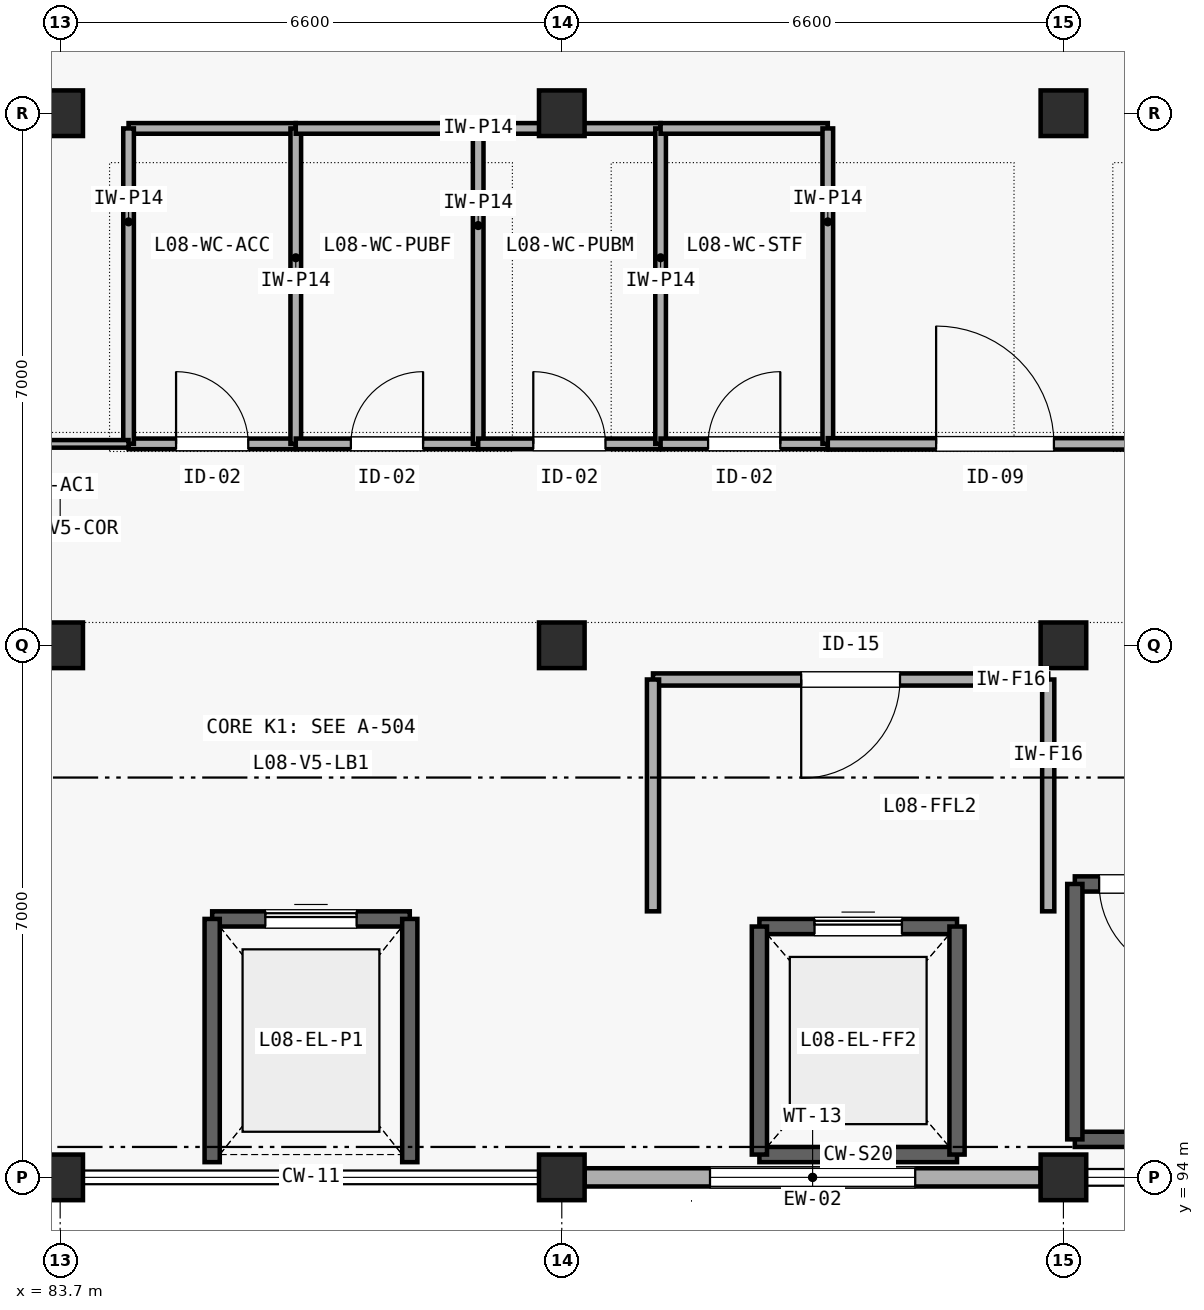
"""IFC4 building model, lengths in metres.
Left out: names, types, materials, properties, quantities, classifications, styles, units other than length and angle.
Written with IfcOpenShell. Run it as: python <this file> out.ifc"""

import sys

from ifc_helpers import new_model, si_unit, direction, frame, frame_2d, origin, origin_2d, place, context, subcontext, project, spatial, rectangle, extrude, element, fill, save


model = new_model("IFC4")
c1 = context("Model", 3, precision=1e-05, world=origin(), true_north=direction((0.0, 1.0)))
c2 = subcontext(c1, "Body", "Model", "MODEL_VIEW")
j1 = project(units=[si_unit("LENGTHUNIT", "METRE"), si_unit("PLANEANGLEUNIT", "RADIAN")], contexts=[c1])
p1 = place(None, origin())
s1 = spatial("IfcSite", under=j1, at=p1, CompositionType="ELEMENT")
p2 = place(p1, origin())
s2 = spatial("IfcBuilding", under=s1, at=p2, CompositionType="ELEMENT")
p3 = place(p2, frame((0.0, 0.0, 33.6)))
s3 = spatial("IfcBuildingStorey", under=s2, at=p3, CompositionType="ELEMENT", Elevation=33.6)
for number, where, z_axis, x_axis in (
    (1, (83.7, 94.0, 0.0), (0.0, 0.0, 1.0), (1.0, 0.0, 0.0)),
    (2, (83.7, 101.0, 0.0), (0.0, 0.0, 1.0), (1.0, 0.0, 0.0)),
    (3, (83.7, 108.0, 0.0), (0.0, 0.0, 1.0), (1.0, 0.0, 0.0)),
    (4, (90.3, 94.0, 0.0), (0.0, 0.0, 1.0), (1.0, 0.0, 0.0)),
    (5, (90.3, 101.0, 0.0), (0.0, 0.0, 1.0), (1.0, 0.0, 0.0)),
    (6, (90.3, 108.0, 0.0), (0.0, 0.0, 1.0), (1.0, 0.0, 0.0)),
    (7, (96.9, 94.0, 0.0), (0.0, 0.0, 1.0), (1.0, 0.0, 0.0)),
    (8, (96.9, 101.0, 0.0), (0.0, 0.0, 1.0), (1.0, 0.0, 0.0)),
    (9, (96.9, 108.0, 0.0), (0.0, 0.0, 1.0), (1.0, 0.0, 0.0)),
):
    element("IfcColumn", number, at=place(p3, frame(where, z_axis=z_axis, x_axis=x_axis)), inside=s3, PredefinedType="COLUMN", context=c2, shape_type="SweptSolid", body=[
        extrude(rectangle(XDim=0.6, YDim=0.6, at=origin_2d()), origin(), (0.0, 0.0, 1.0), 4.2),
    ])
p4 = place(p3, frame((90.6, 94.0, 0.0), z_axis=(0.0, 0.0, 1.0), x_axis=(1.0, 0.0, 0.0)))
e10 = element("IfcWall", 10, at=p4, inside=s3, PredefinedType="SOLIDWALL", context=c2, shape_type="SweptSolid", body=[
    extrude(rectangle(XDim=6.0, YDim=0.24, at=frame_2d((3.0, 0.0))), origin(), (0.0, 0.0, 1.0), 3.365),
])
p5 = place(p4, frame((1.65, 0.0, 0.85)))
e11 = element("IfcOpeningElement", 11, at=p5, cuts=e10, PredefinedType="OPENING", context=c2, shape_type="SweptSolid", body=[
    extrude(rectangle(XDim=2.7, YDim=1.5, at=frame_2d((1.35, 0.75))), frame((0.0, 0.13, 0.0), z_axis=(0.0, -1.0, 0.0), x_axis=(1.0, 0.0, 0.0)), (0.0, 0.0, 1.0), 0.26),
])
p6 = place(p3, frame((97.05, 94.5, 0.0), z_axis=(0.0, 0.0, 1.0), x_axis=(1.0, 0.0, 0.0)))
e12 = element("IfcWall", 12, at=p6, inside=s3, PredefinedType="SHEAR", context=c2, shape_type="SweptSolid", body=[
    extrude(rectangle(XDim=6.3, YDim=0.2, at=frame_2d((3.15, 0.0))), origin(), (0.0, 0.0, 1.0), 4.2),
])
p7 = place(p3, frame((97.05, 97.86, 0.0), z_axis=(0.0, 0.0, 1.0), x_axis=(1.0, 0.0, 0.0)))
e13 = element("IfcWall", 13, at=p7, inside=s3, PredefinedType="SHEAR", context=c2, shape_type="SweptSolid", body=[
    extrude(rectangle(XDim=6.3, YDim=0.2, at=frame_2d((3.15, 0.0))), origin(), (0.0, 0.0, 1.0), 4.2),
])
p8 = place(p7, frame((0.32, 0.0, 0.0)))
e14 = element("IfcOpeningElement", 14, at=p8, cuts=e13, PredefinedType="OPENING", context=c2, shape_type="SweptSolid", body=[
    extrude(rectangle(XDim=1.2, YDim=2.15, at=frame_2d((0.6, 1.075))), frame((0.0, 0.11, 0.0), z_axis=(0.0, -1.0, 0.0), x_axis=(1.0, 0.0, 0.0)), (0.0, 0.0, 1.0), 0.22),
])
p9 = place(p3, frame((97.05, 94.5, 0.0), z_axis=(0.0, 0.0, 1.0), x_axis=(0.0, 1.0, 0.0)))
e15 = element("IfcWall", 15, at=p9, inside=s3, PredefinedType="SHEAR", context=c2, shape_type="SweptSolid", body=[
    extrude(rectangle(XDim=3.36, YDim=0.2, at=frame_2d((1.68, 0.0))), origin(), (0.0, 0.0, 1.0), 4.2),
])
p10 = place(p3, frame((92.9, 94.3, 0.0), z_axis=(0.0, 0.0, 1.0), x_axis=(1.0, 0.0, 0.0)))
e16 = element("IfcWall", 16, at=p10, inside=s3, PredefinedType="SHEAR", context=c2, shape_type="SweptSolid", body=[
    extrude(rectangle(XDim=2.6, YDim=0.2, at=frame_2d((1.3, 0.0))), origin(), (0.0, 0.0, 1.0), 4.2),
])
p11 = place(p3, frame((92.9, 97.3, 0.0), z_axis=(0.0, 0.0, 1.0), x_axis=(1.0, 0.0, 0.0)))
e17 = element("IfcWall", 17, at=p11, inside=s3, PredefinedType="SHEAR", context=c2, shape_type="SweptSolid", body=[
    extrude(rectangle(XDim=2.6, YDim=0.2, at=frame_2d((1.3, 0.0))), origin(), (0.0, 0.0, 1.0), 4.2),
])
p12 = place(p11, frame((0.725, 0.0, 0.0)))
e18 = element("IfcOpeningElement", 18, at=p12, cuts=e17, PredefinedType="OPENING", context=c2, shape_type="SweptSolid", body=[
    extrude(rectangle(XDim=1.15, YDim=2.2, at=frame_2d((0.575, 1.1))), frame((0.0, 0.11, 0.0), z_axis=(0.0, -1.0, 0.0), x_axis=(1.0, 0.0, 0.0)), (0.0, 0.0, 1.0), 0.22),
])
for number, where, z_axis, x_axis in (
    (19, (92.9, 94.3, 0.0), (0.0, 0.0, 1.0), (0.0, 1.0, 0.0)),
    (20, (95.5, 94.3, 0.0), (0.0, 0.0, 1.0), (0.0, 1.0, 0.0)),
):
    element("IfcWall", number, at=place(p3, frame(where, z_axis=z_axis, x_axis=x_axis)), inside=s3, PredefinedType="SHEAR", context=c2, shape_type="SweptSolid", body=[
        extrude(rectangle(XDim=3.0, YDim=0.2, at=frame_2d((1.5, 0.0))), origin(), (0.0, 0.0, 1.0), 4.2),
    ])
p13 = place(p3, frame((85.7, 97.4, 0.0), z_axis=(0.0, 0.0, 1.0), x_axis=(1.0, 0.0, 0.0)))
e21 = element("IfcWall", 21, at=p13, inside=s3, PredefinedType="SHEAR", context=c2, shape_type="SweptSolid", body=[
    extrude(rectangle(XDim=2.6, YDim=0.2, at=frame_2d((1.3, 0.0))), origin(), (0.0, 0.0, 1.0), 4.2),
])
p14 = place(p13, frame((0.7, 0.0, 0.0)))
e22 = element("IfcOpeningElement", 22, at=p14, cuts=e21, PredefinedType="OPENING", context=c2, shape_type="SweptSolid", body=[
    extrude(rectangle(XDim=1.2, YDim=2.2, at=frame_2d((0.6, 1.1))), frame((0.0, 0.11, 0.0), z_axis=(0.0, -1.0, 0.0), x_axis=(1.0, 0.0, 0.0)), (0.0, 0.0, 1.0), 0.22),
])
for number, where, z_axis, x_axis in (
    (23, (85.7, 94.2, 0.0), (0.0, 0.0, 1.0), (0.0, 1.0, 0.0)),
    (24, (88.3, 94.2, 0.0), (0.0, 0.0, 1.0), (0.0, 1.0, 0.0)),
):
    element("IfcWall", number, at=place(p3, frame(where, z_axis=z_axis, x_axis=x_axis)), inside=s3, PredefinedType="SHEAR", context=c2, shape_type="SweptSolid", body=[
        extrude(rectangle(XDim=3.2, YDim=0.2, at=frame_2d((1.6, 0.0))), origin(), (0.0, 0.0, 1.0), 4.2),
    ])
p15 = place(p3, frame((91.5, 100.55, 0.0), z_axis=(0.0, 0.0, 1.0), x_axis=(1.0, 0.0, 0.0)))
e25 = element("IfcWall", 25, at=p15, inside=s3, PredefinedType="SOLIDWALL", context=c2, shape_type="SweptSolid", body=[
    extrude(rectangle(XDim=5.2, YDim=0.16, at=frame_2d((2.6, 0.0))), origin(), (0.0, 0.0, 1.0), 3.9),
])
p16 = place(p15, frame((1.95, 0.0, 0.0)))
e26 = element("IfcOpeningElement", 26, at=p16, cuts=e25, PredefinedType="OPENING", context=c2, shape_type="SweptSolid", body=[
    extrude(rectangle(XDim=1.3, YDim=2.15, at=frame_2d((0.65, 1.075))), frame((0.0, 0.09, 0.0), z_axis=(0.0, -1.0, 0.0), x_axis=(1.0, 0.0, 0.0)), (0.0, 0.0, 1.0), 0.18),
])
p17 = place(p3, frame((91.5, 97.5, 0.0), z_axis=(0.0, 0.0, 1.0), x_axis=(0.0, 1.0, 0.0)))
e27 = element("IfcWall", 27, at=p17, inside=s3, PredefinedType="SOLIDWALL", context=c2, shape_type="SweptSolid", body=[
    extrude(rectangle(XDim=3.05, YDim=0.16, at=frame_2d((1.525, 0.0))), origin(), (0.0, 0.0, 1.0), 3.9),
])
p18 = place(p3, frame((96.7, 97.5, 0.0), z_axis=(0.0, 0.0, 1.0), x_axis=(0.0, 1.0, 0.0)))
e28 = element("IfcWall", 28, at=p18, inside=s3, PredefinedType="SOLIDWALL", context=c2, shape_type="SweptSolid", body=[
    extrude(rectangle(XDim=3.05, YDim=0.16, at=frame_2d((1.525, 0.0))), origin(), (0.0, 0.0, 1.0), 3.405),
])
p19 = place(p3, frame((84.6, 103.65, 0.0), z_axis=(0.0, 0.0, 1.0), x_axis=(1.0, 0.0, 0.0)))
e29 = element("IfcWall", 29, at=p19, inside=s3, PredefinedType="PLUMBINGWALL", context=c2, shape_type="SweptSolid", body=[
    extrude(rectangle(XDim=2.2, YDim=0.14, at=frame_2d((1.1, 0.0))), origin(), (0.0, 0.0, 1.0), 3.9),
])
p20 = place(p19, frame((0.625, 0.0, 0.0)))
e30 = element("IfcOpeningElement", 30, at=p20, cuts=e29, PredefinedType="OPENING", context=c2, shape_type="SweptSolid", body=[
    extrude(rectangle(XDim=0.95, YDim=2.1, at=frame_2d((0.475, 1.05))), frame((0.0, 0.08, 0.0), z_axis=(0.0, -1.0, 0.0), x_axis=(1.0, 0.0, 0.0)), (0.0, 0.0, 1.0), 0.16),
])
p21 = place(p3, frame((84.6, 107.8, 0.0), z_axis=(0.0, 0.0, 1.0), x_axis=(1.0, 0.0, 0.0)))
e31 = element("IfcWall", 31, at=p21, inside=s3, PredefinedType="PLUMBINGWALL", context=c2, shape_type="SweptSolid", body=[
    extrude(rectangle(XDim=2.2, YDim=0.14, at=frame_2d((1.1, 0.0))), origin(), (0.0, 0.0, 1.0), 3.365),
])
for number, where, z_axis, x_axis in (
    (32, (84.6, 103.65, 0.0), (0.0, 0.0, 1.0), (0.0, 1.0, 0.0)),
    (33, (86.8, 103.65, 0.0), (0.0, 0.0, 1.0), (0.0, 1.0, 0.0)),
):
    element("IfcWall", number, at=place(p3, frame(where, z_axis=z_axis, x_axis=x_axis)), inside=s3, PredefinedType="PLUMBINGWALL", context=c2, shape_type="SweptSolid", body=[
        extrude(rectangle(XDim=4.15, YDim=0.14, at=frame_2d((2.075, 0.0))), origin(), (0.0, 0.0, 1.0), 3.9),
    ])
p22 = place(p3, frame((86.8, 103.65, 0.0), z_axis=(0.0, 0.0, 1.0), x_axis=(1.0, 0.0, 0.0)))
e34 = element("IfcWall", 34, at=p22, inside=s3, PredefinedType="PLUMBINGWALL", context=c2, shape_type="SweptSolid", body=[
    extrude(rectangle(XDim=2.4, YDim=0.14, at=frame_2d((1.2, 0.0))), origin(), (0.0, 0.0, 1.0), 3.9),
])
p23 = place(p22, frame((0.725, 0.0, 0.0)))
e35 = element("IfcOpeningElement", 35, at=p23, cuts=e34, PredefinedType="OPENING", context=c2, shape_type="SweptSolid", body=[
    extrude(rectangle(XDim=0.95, YDim=2.1, at=frame_2d((0.475, 1.05))), frame((0.0, 0.08, 0.0), z_axis=(0.0, -1.0, 0.0), x_axis=(1.0, 0.0, 0.0)), (0.0, 0.0, 1.0), 0.16),
])
p24 = place(p3, frame((86.8, 107.8, 0.0), z_axis=(0.0, 0.0, 1.0), x_axis=(1.0, 0.0, 0.0)))
e36 = element("IfcWall", 36, at=p24, inside=s3, PredefinedType="PLUMBINGWALL", context=c2, shape_type="SweptSolid", body=[
    extrude(rectangle(XDim=2.4, YDim=0.14, at=frame_2d((1.2, 0.0))), origin(), (0.0, 0.0, 1.0), 3.365),
])
p25 = place(p3, frame((89.2, 103.65, 0.0), z_axis=(0.0, 0.0, 1.0), x_axis=(0.0, 1.0, 0.0)))
e37 = element("IfcWall", 37, at=p25, inside=s3, PredefinedType="PLUMBINGWALL", context=c2, shape_type="SweptSolid", body=[
    extrude(rectangle(XDim=4.15, YDim=0.14, at=frame_2d((2.075, 0.0))), origin(), (0.0, 0.0, 1.0), 3.9),
])
p26 = place(p3, frame((89.2, 103.65, 0.0), z_axis=(0.0, 0.0, 1.0), x_axis=(1.0, 0.0, 0.0)))
e38 = element("IfcWall", 38, at=p26, inside=s3, PredefinedType="PLUMBINGWALL", context=c2, shape_type="SweptSolid", body=[
    extrude(rectangle(XDim=2.4, YDim=0.14, at=frame_2d((1.2, 0.0))), origin(), (0.0, 0.0, 1.0), 3.9),
])
p27 = place(p26, frame((0.725, 0.0, 0.0)))
e39 = element("IfcOpeningElement", 39, at=p27, cuts=e38, PredefinedType="OPENING", context=c2, shape_type="SweptSolid", body=[
    extrude(rectangle(XDim=0.95, YDim=2.1, at=frame_2d((0.475, 1.05))), frame((0.0, 0.08, 0.0), z_axis=(0.0, -1.0, 0.0), x_axis=(1.0, 0.0, 0.0)), (0.0, 0.0, 1.0), 0.16),
])
p28 = place(p3, frame((89.2, 107.8, 0.0), z_axis=(0.0, 0.0, 1.0), x_axis=(1.0, 0.0, 0.0)))
e40 = element("IfcWall", 40, at=p28, inside=s3, PredefinedType="PLUMBINGWALL", context=c2, shape_type="SweptSolid", body=[
    extrude(rectangle(XDim=2.4, YDim=0.14, at=frame_2d((1.2, 0.0))), origin(), (0.0, 0.0, 1.0), 3.365),
])
p29 = place(p3, frame((91.6, 103.65, 0.0), z_axis=(0.0, 0.0, 1.0), x_axis=(0.0, 1.0, 0.0)))
e41 = element("IfcWall", 41, at=p29, inside=s3, PredefinedType="PLUMBINGWALL", context=c2, shape_type="SweptSolid", body=[
    extrude(rectangle(XDim=4.15, YDim=0.14, at=frame_2d((2.075, 0.0))), origin(), (0.0, 0.0, 1.0), 3.9),
])
p30 = place(p3, frame((91.6, 103.65, 0.0), z_axis=(0.0, 0.0, 1.0), x_axis=(1.0, 0.0, 0.0)))
e42 = element("IfcWall", 42, at=p30, inside=s3, PredefinedType="PLUMBINGWALL", context=c2, shape_type="SweptSolid", body=[
    extrude(rectangle(XDim=2.2, YDim=0.14, at=frame_2d((1.1, 0.0))), origin(), (0.0, 0.0, 1.0), 3.9),
])
p31 = place(p30, frame((0.625, 0.0, 0.0)))
e43 = element("IfcOpeningElement", 43, at=p31, cuts=e42, PredefinedType="OPENING", context=c2, shape_type="SweptSolid", body=[
    extrude(rectangle(XDim=0.95, YDim=2.1, at=frame_2d((0.475, 1.05))), frame((0.0, 0.08, 0.0), z_axis=(0.0, -1.0, 0.0), x_axis=(1.0, 0.0, 0.0)), (0.0, 0.0, 1.0), 0.16),
])
p32 = place(p3, frame((91.6, 107.8, 0.0), z_axis=(0.0, 0.0, 1.0), x_axis=(1.0, 0.0, 0.0)))
e44 = element("IfcWall", 44, at=p32, inside=s3, PredefinedType="PLUMBINGWALL", context=c2, shape_type="SweptSolid", body=[
    extrude(rectangle(XDim=2.2, YDim=0.14, at=frame_2d((1.1, 0.0))), origin(), (0.0, 0.0, 1.0), 3.365),
])
p33 = place(p3, frame((93.8, 103.65, 0.0), z_axis=(0.0, 0.0, 1.0), x_axis=(0.0, 1.0, 0.0)))
e45 = element("IfcWall", 45, at=p33, inside=s3, PredefinedType="PLUMBINGWALL", context=c2, shape_type="SweptSolid", body=[
    extrude(rectangle(XDim=4.15, YDim=0.14, at=frame_2d((2.075, 0.0))), origin(), (0.0, 0.0, 1.0), 3.9),
])
p34 = place(p3, frame((72.2, 103.65, 0.0), z_axis=(0.0, 0.0, 1.0), x_axis=(1.0, 0.0, 0.0)))
e46 = element("IfcWall", 46, at=p34, inside=s3, PredefinedType="PARTITIONING", context=c2, shape_type="SweptSolid", body=[
    extrude(rectangle(XDim=12.4, YDim=0.1, at=frame_2d((6.2, 0.0))), origin(), (0.0, 0.0, 1.0), 3.9),
])
p35 = place(p34, frame((5.475, 0.0, 0.0)))
e47 = element("IfcOpeningElement", 47, at=p35, cuts=e46, PredefinedType="OPENING", context=c2, shape_type="SweptSolid", body=[
    extrude(rectangle(XDim=1.45, YDim=2.2, at=frame_2d((0.725, 1.1))), frame((0.0, 0.06, 0.0), z_axis=(0.0, -1.0, 0.0), x_axis=(1.0, 0.0, 0.0)), (0.0, 0.0, 1.0), 0.12),
])
p36 = place(p3, frame((93.8, 103.65, 0.0), z_axis=(0.0, 0.0, 1.0), x_axis=(1.0, 0.0, 0.0)))
e48 = element("IfcWall", 48, at=p36, inside=s3, PredefinedType="PARTITIONING", context=c2, shape_type="SweptSolid", body=[
    extrude(rectangle(XDim=4.4, YDim=0.15, at=frame_2d((2.2, 0.0))), origin(), (0.0, 0.0, 1.0), 3.9),
])
p37 = place(p36, frame((1.425, 0.0, 0.0)))
e49 = element("IfcOpeningElement", 49, at=p37, cuts=e48, PredefinedType="OPENING", context=c2, shape_type="SweptSolid", body=[
    extrude(rectangle(XDim=1.55, YDim=2.2, at=frame_2d((0.775, 1.1))), frame((0.0, 0.085, 0.0), z_axis=(0.0, -1.0, 0.0), x_axis=(1.0, 0.0, 0.0)), (0.0, 0.0, 1.0), 0.17),
])
p38 = place(p5, origin())
e50 = element("IfcWindow", 50, at=p38, inside=s3, PartitioningType="SINGLE_PANEL", PredefinedType="WINDOW", context=c2, shape_type="SweptSolid", body=[
    extrude(rectangle(XDim=2.7, YDim=1.5, at=frame_2d((1.35, 0.75))), frame((0.0, 0.03, 0.0), z_axis=(0.0, -1.0, 0.0), x_axis=(1.0, 0.0, 0.0)), (0.0, 0.0, 1.0), 0.06),
])
fill(e11, e50)
p39 = place(p8, frame((1.2, 0.0, 0.0), z_axis=(0.0, 0.0, 1.0), x_axis=(-1.0, 0.0, 0.0)))
e51 = element("IfcDoor", 51, at=p39, inside=s3, OperationType="SINGLE_SWING_LEFT", PredefinedType="DOOR", context=c2, shape_type="SweptSolid", body=[
    extrude(rectangle(XDim=1.2, YDim=2.15, at=frame_2d((0.6, 1.075))), frame((0.0, 0.025, 0.0), z_axis=(0.0, -1.0, 0.0), x_axis=(1.0, 0.0, 0.0)), (0.0, 0.0, 1.0), 0.05),
])
fill(e14, e51)
p40 = place(p12, origin())
e52 = element("IfcDoor", 52, at=p40, inside=s3, OperationType="SLIDING_TO_LEFT", PredefinedType="DOOR", context=c2, shape_type="SweptSolid", body=[
    extrude(rectangle(XDim=1.15, YDim=2.2, at=frame_2d((0.575, 1.1))), frame((0.0, 0.025, 0.0), z_axis=(0.0, -1.0, 0.0), x_axis=(1.0, 0.0, 0.0)), (0.0, 0.0, 1.0), 0.05),
])
fill(e18, e52)
p41 = place(p14, origin())
e53 = element("IfcDoor", 53, at=p41, inside=s3, OperationType="SLIDING_TO_LEFT", PredefinedType="DOOR", context=c2, shape_type="SweptSolid", body=[
    extrude(rectangle(XDim=1.2, YDim=2.2, at=frame_2d((0.6, 1.1))), frame((0.0, 0.025, 0.0), z_axis=(0.0, -1.0, 0.0), x_axis=(1.0, 0.0, 0.0)), (0.0, 0.0, 1.0), 0.05),
])
fill(e22, e53)
p42 = place(p16, frame((1.3, 0.0, 0.0), z_axis=(0.0, 0.0, 1.0), x_axis=(-1.0, 0.0, 0.0)))
e54 = element("IfcDoor", 54, at=p42, inside=s3, OperationType="SINGLE_SWING_RIGHT", PredefinedType="DOOR", context=c2, shape_type="SweptSolid", body=[
    extrude(rectangle(XDim=1.3, YDim=2.15, at=frame_2d((0.65, 1.075))), frame((0.0, 0.025, 0.0), z_axis=(0.0, -1.0, 0.0), x_axis=(1.0, 0.0, 0.0)), (0.0, 0.0, 1.0), 0.05),
])
fill(e26, e54)
p43 = place(p20, origin())
e55 = element("IfcDoor", 55, at=p43, inside=s3, OperationType="SINGLE_SWING_LEFT", PredefinedType="DOOR", context=c2, shape_type="SweptSolid", body=[
    extrude(rectangle(XDim=0.95, YDim=2.1, at=frame_2d((0.475, 1.05))), frame((0.0, 0.025, 0.0), z_axis=(0.0, -1.0, 0.0), x_axis=(1.0, 0.0, 0.0)), (0.0, 0.0, 1.0), 0.05),
])
fill(e30, e55)
p44 = place(p23, origin())
e56 = element("IfcDoor", 56, at=p44, inside=s3, OperationType="SINGLE_SWING_RIGHT", PredefinedType="DOOR", context=c2, shape_type="SweptSolid", body=[
    extrude(rectangle(XDim=0.95, YDim=2.1, at=frame_2d((0.475, 1.05))), frame((0.0, 0.025, 0.0), z_axis=(0.0, -1.0, 0.0), x_axis=(1.0, 0.0, 0.0)), (0.0, 0.0, 1.0), 0.05),
])
fill(e35, e56)
p45 = place(p27, origin())
e57 = element("IfcDoor", 57, at=p45, inside=s3, OperationType="SINGLE_SWING_LEFT", PredefinedType="DOOR", context=c2, shape_type="SweptSolid", body=[
    extrude(rectangle(XDim=0.95, YDim=2.1, at=frame_2d((0.475, 1.05))), frame((0.0, 0.025, 0.0), z_axis=(0.0, -1.0, 0.0), x_axis=(1.0, 0.0, 0.0)), (0.0, 0.0, 1.0), 0.05),
])
fill(e39, e57)
p46 = place(p31, origin())
e58 = element("IfcDoor", 58, at=p46, inside=s3, OperationType="SINGLE_SWING_RIGHT", PredefinedType="DOOR", context=c2, shape_type="SweptSolid", body=[
    extrude(rectangle(XDim=0.95, YDim=2.1, at=frame_2d((0.475, 1.05))), frame((0.0, 0.025, 0.0), z_axis=(0.0, -1.0, 0.0), x_axis=(1.0, 0.0, 0.0)), (0.0, 0.0, 1.0), 0.05),
])
fill(e43, e58)
p47 = place(p37, origin())
e59 = element("IfcDoor", 59, at=p47, inside=s3, OperationType="SINGLE_SWING_LEFT", PredefinedType="DOOR", context=c2, shape_type="SweptSolid", body=[
    extrude(rectangle(XDim=1.55, YDim=2.2, at=frame_2d((0.775, 1.1))), frame((0.0, 0.025, 0.0), z_axis=(0.0, -1.0, 0.0), x_axis=(1.0, 0.0, 0.0)), (0.0, 0.0, 1.0), 0.05),
])
fill(e49, e59)
save(model, sys.argv[1])
